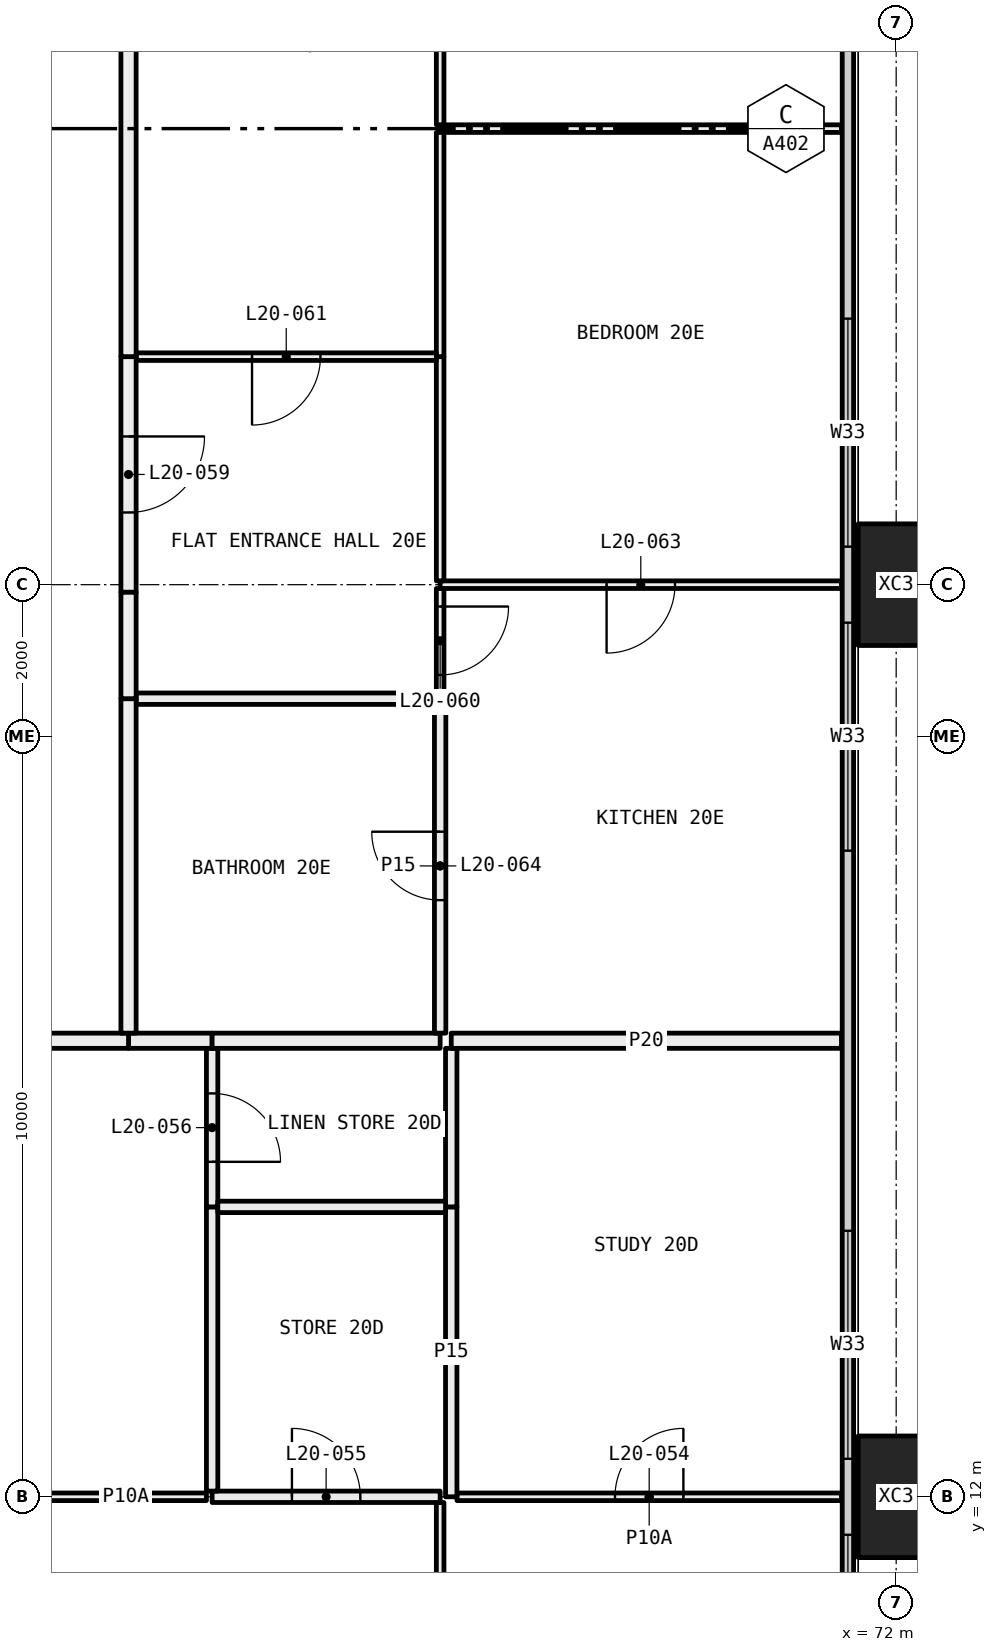
"""IFC4 building model, lengths in metres.
Left out: names, types, materials, properties, quantities, classifications, styles, units other than length and angle.
Written with IfcOpenShell. Run it as: python <this file> out.ifc"""

import sys

from ifc_helpers import new_model, si_unit, direction, frame, frame_2d, origin, origin_2d, place, context, subcontext, project, spatial, rectangle, hollow_rectangle, extrude, element, fill, save


model = new_model("IFC4")
c1 = context("Model", 3, precision=1e-05, world=origin(), true_north=direction((0.0, 1.0)))
c2 = subcontext(c1, "Body", "Model", "MODEL_VIEW")
j1 = project(units=[si_unit("LENGTHUNIT", "METRE"), si_unit("PLANEANGLEUNIT", "RADIAN")], contexts=[c1])
p1 = place(None, origin())
s1 = spatial("IfcSite", under=j1, at=p1, CompositionType="ELEMENT")
p2 = place(p1, origin())
s2 = spatial("IfcBuilding", under=s1, at=p2, CompositionType="ELEMENT")
p3 = place(p2, frame((0.0, 0.0, 81.75)))
s3 = spatial("IfcBuildingStorey", under=s2, at=p3, CompositionType="ELEMENT", Elevation=81.75)
for number, where, z_axis, x_axis in (
    (1, (72.0, 12.0, -0.4), (0.0, 0.0, 1.0), (0.0, 1.0, 0.0)),
    (2, (72.0, 24.0, -0.4), (0.0, 0.0, 1.0), (0.0, 1.0, 0.0)),
):
    element("IfcColumn", number, at=place(p3, frame(where, z_axis=z_axis, x_axis=x_axis)), inside=s3, PredefinedType="COLUMN", context=c2, shape_type="SweptSolid", body=[
        extrude(hollow_rectangle(XDim=1.6, YDim=1.0, WallThickness=0.065, at=origin_2d()), origin(), (0.0, 0.0, 1.0), 3.45),
    ])
p4 = place(p3, frame((71.365, 6.71, 0.0), z_axis=(0.0, 0.0, 1.0), x_axis=(0.0, 1.0, 0.0)))
e3 = element("IfcWall", 3, at=p4, inside=s3, PredefinedType="ELEMENTEDWALL", context=c2, shape_type="SweptSolid", body=[
    extrude(rectangle(XDim=34.58, YDim=0.15, at=frame_2d((17.29, 0.0))), origin(), (0.0, 0.0, 1.0), 3.05),
])
p5 = place(p4, frame((0.29, 0.0, 0.45)))
e4 = element("IfcOpeningElement", 4, at=p5, cuts=e3, PredefinedType="OPENING", context=c2, shape_type="SweptSolid", body=[
    extrude(rectangle(XDim=4.5, YDim=2.55, at=frame_2d((2.25, 1.275))), frame((0.0, 0.085, 0.0), z_axis=(0.0, -1.0, 0.0), x_axis=(1.0, 0.0, 0.0)), (0.0, 0.0, 1.0), 0.17),
])
p6 = place(p4, frame((5.79, 0.0, 0.45)))
e5 = element("IfcOpeningElement", 5, at=p6, cuts=e3, PredefinedType="OPENING", context=c2, shape_type="SweptSolid", body=[
    extrude(rectangle(XDim=3.0, YDim=2.55, at=frame_2d((1.5, 1.275))), frame((0.0, 0.085, 0.0), z_axis=(0.0, -1.0, 0.0), x_axis=(1.0, 0.0, 0.0)), (0.0, 0.0, 1.0), 0.17),
])
p7 = place(p4, frame((13.79, 0.0, 0.45)))
e6 = element("IfcOpeningElement", 6, at=p7, cuts=e3, PredefinedType="OPENING", context=c2, shape_type="SweptSolid", body=[
    extrude(rectangle(XDim=3.0, YDim=2.55, at=frame_2d((1.5, 1.275))), frame((0.0, 0.085, 0.0), z_axis=(0.0, -1.0, 0.0), x_axis=(1.0, 0.0, 0.0)), (0.0, 0.0, 1.0), 0.17),
])
p8 = place(p4, frame((17.79, 0.0, 0.45)))
e7 = element("IfcOpeningElement", 7, at=p8, cuts=e3, PredefinedType="OPENING", context=c2, shape_type="SweptSolid", body=[
    extrude(rectangle(XDim=3.0, YDim=2.55, at=frame_2d((1.5, 1.275))), frame((0.0, 0.085, 0.0), z_axis=(0.0, -1.0, 0.0), x_axis=(1.0, 0.0, 0.0)), (0.0, 0.0, 1.0), 0.17),
])
p9 = place(p4, frame((26.79, 0.0, 0.45)))
e8 = element("IfcOpeningElement", 8, at=p9, cuts=e3, PredefinedType="OPENING", context=c2, shape_type="SweptSolid", body=[
    extrude(rectangle(XDim=2.0, YDim=2.55, at=frame_2d((1.0, 1.275))), frame((0.0, 0.085, 0.0), z_axis=(0.0, -1.0, 0.0), x_axis=(1.0, 0.0, 0.0)), (0.0, 0.0, 1.0), 0.17),
])
p10 = place(p4, frame((29.79, 0.0, 0.45)))
e9 = element("IfcOpeningElement", 9, at=p10, cuts=e3, PredefinedType="OPENING", context=c2, shape_type="SweptSolid", body=[
    extrude(rectangle(XDim=4.5, YDim=2.55, at=frame_2d((2.25, 1.275))), frame((0.0, 0.085, 0.0), z_axis=(0.0, -1.0, 0.0), x_axis=(1.0, 0.0, 0.0)), (0.0, 0.0, 1.0), 0.17),
])
p11 = place(p3, frame((66.0, 6.72, 0.0), z_axis=(0.0, 0.0, 1.0), x_axis=(0.0, 1.0, 0.0)))
e10 = element("IfcWall", 10, at=p11, inside=s3, PredefinedType="PARTITIONING", context=c2, shape_type="SweptSolid", body=[
    extrude(rectangle(XDim=5.205, YDim=0.1, at=frame_2d((2.603, 0.0))), origin(), (0.0, 0.0, 1.0), 2.45),
])
p12 = place(p11, frame((2.153, 0.0, 0.0)))
e11 = element("IfcOpeningElement", 11, at=p12, cuts=e10, PredefinedType="OPENING", context=c2, shape_type="SweptSolid", body=[
    extrude(rectangle(XDim=0.9, YDim=2.1, at=frame_2d((0.45, 1.05))), frame((0.0, 0.06, 0.0), z_axis=(0.0, -1.0, 0.0), x_axis=(1.0, 0.0, 0.0)), (0.0, 0.0, 1.0), 0.12),
])
p13 = place(p3, frame((62.925, 12.0, 0.0), z_axis=(0.0, 0.0, 1.0), x_axis=(-1.0, 0.0, 0.0)))
e12 = element("IfcWall", 12, at=p13, inside=s3, PredefinedType="PARTITIONING", context=c2, shape_type="SweptSolid", body=[
    extrude(rectangle(XDim=2.125, YDim=0.1, at=frame_2d((1.062, 0.0))), origin(), (0.0, 0.0, 1.0), 2.45),
])
p14 = place(p3, frame((66.0, 12.0, 0.0), z_axis=(0.0, 0.0, 1.0), x_axis=(-1.0, 0.0, 0.0)))
e13 = element("IfcWall", 13, at=p14, inside=s3, PredefinedType="PARTITIONING", context=c2, shape_type="SweptSolid", body=[
    extrude(rectangle(XDim=3.0, YDim=0.15, at=frame_2d((1.5, 0.0))), origin(), (0.0, 0.0, 1.0), 2.45),
])
p15 = place(p14, frame((1.05, 0.0, 0.0)))
e14 = element("IfcOpeningElement", 14, at=p15, cuts=e13, PredefinedType="OPENING", context=c2, shape_type="SweptSolid", body=[
    extrude(rectangle(XDim=0.9, YDim=2.1, at=frame_2d((0.45, 1.05))), frame((0.0, 0.085, 0.0), z_axis=(0.0, -1.0, 0.0), x_axis=(1.0, 0.0, 0.0)), (0.0, 0.0, 1.0), 0.17),
])
p16 = place(p3, frame((71.28, 12.0, 0.0), z_axis=(0.0, 0.0, 1.0), x_axis=(-1.0, 0.0, 0.0)))
e15 = element("IfcWall", 15, at=p16, inside=s3, PredefinedType="PARTITIONING", context=c2, shape_type="SweptSolid", body=[
    extrude(rectangle(XDim=5.059, YDim=0.1, at=frame_2d((2.53, 0.0))), origin(), (0.0, 0.0, 1.0), 2.45),
])
p17 = place(p16, frame((2.08, 0.0, 0.0)))
e16 = element("IfcOpeningElement", 16, at=p17, cuts=e15, PredefinedType="OPENING", context=c2, shape_type="SweptSolid", body=[
    extrude(rectangle(XDim=0.9, YDim=2.1, at=frame_2d((0.45, 1.05))), frame((0.0, 0.06, 0.0), z_axis=(0.0, -1.0, 0.0), x_axis=(1.0, 0.0, 0.0)), (0.0, 0.0, 1.0), 0.12),
])
p18 = place(p3, frame((63.0, 12.075, 0.0), z_axis=(0.0, 0.0, 1.0), x_axis=(0.0, 1.0, 0.0)))
e17 = element("IfcWall", 17, at=p18, inside=s3, PredefinedType="PARTITIONING", context=c2, shape_type="SweptSolid", body=[
    extrude(rectangle(XDim=3.739, YDim=0.15, at=frame_2d((1.87, 0.0))), origin(), (0.0, 0.0, 1.0), 2.45),
])
p19 = place(p3, frame((63.0, 15.814, 0.0), z_axis=(0.0, 0.0, 1.0), x_axis=(0.0, 1.0, 0.0)))
e18 = element("IfcWall", 18, at=p19, inside=s3, PredefinedType="PARTITIONING", context=c2, shape_type="SweptSolid", body=[
    extrude(rectangle(XDim=2.086, YDim=0.15, at=frame_2d((1.043, 0.0))), origin(), (0.0, 0.0, 1.0), 3.05),
])
p20 = place(p19, frame((0.593, 0.0, 0.0)))
e19 = element("IfcOpeningElement", 19, at=p20, cuts=e18, PredefinedType="OPENING", context=c2, shape_type="SweptSolid", body=[
    extrude(rectangle(XDim=0.9, YDim=2.1, at=frame_2d((0.45, 1.05))), frame((0.0, 0.085, 0.0), z_axis=(0.0, -1.0, 0.0), x_axis=(1.0, 0.0, 0.0)), (0.0, 0.0, 1.0), 0.17),
])
p21 = place(p3, frame((63.0, 18.0, 0.0), z_axis=(0.0, 0.0, 1.0), x_axis=(-1.0, 0.0, 0.0)))
e20 = element("IfcWall", 20, at=p21, inside=s3, PredefinedType="PARTITIONING", context=c2, shape_type="SweptSolid", body=[
    extrude(rectangle(XDim=1.1, YDim=0.2, at=frame_2d((0.55, 0.0))), origin(), (0.0, 0.0, 1.0), 3.05),
])
p22 = place(p3, frame((61.9, 18.0, 0.0), z_axis=(0.0, 0.0, 1.0), x_axis=(-1.0, 0.0, 0.0)))
e21 = element("IfcWall", 21, at=p22, inside=s3, PredefinedType="PARTITIONING", context=c2, shape_type="SweptSolid", body=[
    extrude(rectangle(XDim=7.9, YDim=0.2, at=frame_2d((3.95, 0.0))), origin(), (0.0, 0.0, 1.0), 3.05),
])
p23 = place(p3, frame((66.146, 15.814, 0.0), z_axis=(0.0, 0.0, 1.0), x_axis=(0.0, -1.0, 0.0)))
e22 = element("IfcWall", 22, at=p23, inside=s3, PredefinedType="PARTITIONING", context=c2, shape_type="SweptSolid", body=[
    extrude(rectangle(XDim=3.814, YDim=0.15, at=frame_2d((1.907, 0.0))), origin(), (0.0, 0.0, 1.0), 2.45),
])
p24 = place(p3, frame((66.146, 17.9, 0.0), z_axis=(0.0, 0.0, 1.0), x_axis=(0.0, -1.0, 0.0)))
e23 = element("IfcWall", 23, at=p24, inside=s3, PredefinedType="PARTITIONING", context=c2, shape_type="SweptSolid", body=[
    extrude(rectangle(XDim=2.086, YDim=0.15, at=frame_2d((1.043, 0.0))), origin(), (0.0, 0.0, 1.0), 2.55),
])
p25 = place(p3, frame((71.28, 18.0, 0.0), z_axis=(0.0, 0.0, 1.0), x_axis=(-1.0, 0.0, 0.0)))
e24 = element("IfcWall", 24, at=p25, inside=s3, PredefinedType="PARTITIONING", context=c2, shape_type="SweptSolid", body=[
    extrude(rectangle(XDim=5.134, YDim=0.2, at=frame_2d((2.567, 0.0))), origin(), (0.0, 0.0, 1.0), 3.05),
])
p26 = place(p3, frame((66.071, 15.814, 0.0), z_axis=(0.0, 0.0, 1.0), x_axis=(-1.0, 0.0, 0.0)))
e25 = element("IfcWall", 25, at=p26, inside=s3, PredefinedType="PARTITIONING", context=c2, shape_type="SweptSolid", body=[
    extrude(rectangle(XDim=2.996, YDim=0.15, at=frame_2d((1.498, 0.0))), origin(), (0.0, 0.0, 1.0), 3.05),
])
p27 = place(p3, frame((66.0, 18.0, 0.0), z_axis=(0.0, 0.0, 1.0), x_axis=(-1.0, 0.0, 0.0)))
e26 = element("IfcWall", 26, at=p27, inside=s3, PredefinedType="PARTITIONING", context=c2, shape_type="SweptSolid", body=[
    extrude(rectangle(XDim=3.0, YDim=0.2, at=frame_2d((1.5, 0.0))), origin(), (0.0, 0.0, 1.0), 3.05),
])
p28 = place(p3, frame((71.28, 24.0, 0.0), z_axis=(0.0, 0.0, 1.0), x_axis=(-1.0, 0.0, 0.0)))
e27 = element("IfcWall", 27, at=p28, inside=s3, PredefinedType="PARTITIONING", context=c2, shape_type="SweptSolid", body=[
    extrude(rectangle(XDim=5.28, YDim=0.1, at=frame_2d((2.64, 0.0))), origin(), (0.0, 0.0, 1.0), 2.45),
])
p29 = place(p28, frame((2.19, 0.0, 0.0)))
e28 = element("IfcOpeningElement", 28, at=p29, cuts=e27, PredefinedType="OPENING", context=c2, shape_type="SweptSolid", body=[
    extrude(rectangle(XDim=0.9, YDim=2.1, at=frame_2d((0.45, 1.05))), frame((0.0, 0.06, 0.0), z_axis=(0.0, -1.0, 0.0), x_axis=(1.0, 0.0, 0.0)), (0.0, 0.0, 1.0), 0.12),
])
p30 = place(p3, frame((66.0, 22.5, 0.0), z_axis=(0.0, 0.0, 1.0), x_axis=(0.0, -1.0, 0.0)))
e29 = element("IfcWall", 29, at=p30, inside=s3, PredefinedType="PARTITIONING", context=c2, shape_type="SweptSolid", body=[
    extrude(rectangle(XDim=4.4, YDim=0.15, at=frame_2d((2.2, 0.0))), origin(), (0.0, 0.0, 1.0), 3.05),
])
p31 = place(p30, frame((1.75, 0.0, 0.0)))
e30 = element("IfcOpeningElement", 30, at=p31, cuts=e29, PredefinedType="OPENING", context=c2, shape_type="SweptSolid", body=[
    extrude(rectangle(XDim=0.9, YDim=2.1, at=frame_2d((0.45, 1.05))), frame((0.0, 0.085, 0.0), z_axis=(0.0, -1.0, 0.0), x_axis=(1.0, 0.0, 0.0)), (0.0, 0.0, 1.0), 0.17),
])
p32 = place(p3, frame((66.0, 23.95, 0.0), z_axis=(0.0, 0.0, 1.0), x_axis=(0.0, -1.0, 0.0)))
e31 = element("IfcWall", 31, at=p32, inside=s3, PredefinedType="PARTITIONING", context=c2, shape_type="SweptSolid", body=[
    extrude(rectangle(XDim=1.375, YDim=0.1, at=frame_2d((0.688, 0.0))), origin(), (0.0, 0.0, 1.0), 2.45),
])
p33 = place(p32, frame((0.238, 0.0, 0.0)))
e32 = element("IfcOpeningElement", 32, at=p33, cuts=e31, PredefinedType="OPENING", context=c2, shape_type="SweptSolid", body=[
    extrude(rectangle(XDim=0.9, YDim=2.1, at=frame_2d((0.45, 1.05))), frame((0.0, 0.06, 0.0), z_axis=(0.0, -1.0, 0.0), x_axis=(1.0, 0.0, 0.0)), (0.0, 0.0, 1.0), 0.12),
])
p34 = place(p3, frame((71.28, 30.0, 0.0), z_axis=(0.0, 0.0, 1.0), x_axis=(-1.0, 0.0, 0.0)))
e33 = element("IfcWall", 33, at=p34, inside=s3, PredefinedType="PARTITIONING", context=c2, shape_type="SweptSolid", body=[
    extrude(rectangle(XDim=5.28, YDim=0.1, at=frame_2d((2.64, 0.0))), origin(), (0.0, 0.0, 1.0), 3.05),
])
p35 = place(p3, frame((66.0, 27.0, 0.0), z_axis=(0.0, 0.0, 1.0), x_axis=(0.0, -1.0, 0.0)))
e34 = element("IfcWall", 34, at=p35, inside=s3, PredefinedType="PARTITIONING", context=c2, shape_type="SweptSolid", body=[
    extrude(rectangle(XDim=2.95, YDim=0.1, at=frame_2d((1.475, 0.0))), origin(), (0.0, 0.0, 1.0), 2.45),
])
p36 = place(p3, frame((66.0, 29.95, 0.0), z_axis=(0.0, 0.0, 1.0), x_axis=(0.0, -1.0, 0.0)))
e35 = element("IfcWall", 35, at=p36, inside=s3, PredefinedType="PARTITIONING", context=c2, shape_type="SweptSolid", body=[
    extrude(rectangle(XDim=2.95, YDim=0.1, at=frame_2d((1.475, 0.0))), origin(), (0.0, 0.0, 1.0), 3.05),
])
p37 = place(p3, frame((66.0, 35.9, 0.0), z_axis=(0.0, 0.0, 1.0), x_axis=(0.0, -1.0, 0.0)))
e36 = element("IfcWall", 36, at=p37, inside=s3, PredefinedType="PARTITIONING", context=c2, shape_type="SweptSolid", body=[
    extrude(rectangle(XDim=5.85, YDim=0.1, at=frame_2d((2.925, 0.0))), origin(), (0.0, 0.0, 1.0), 3.05),
])
p38 = place(p37, frame((2.475, 0.0, 0.0)))
e37 = element("IfcOpeningElement", 37, at=p38, cuts=e36, PredefinedType="OPENING", context=c2, shape_type="SweptSolid", body=[
    extrude(rectangle(XDim=0.9, YDim=2.1, at=frame_2d((0.45, 1.05))), frame((0.0, 0.06, 0.0), z_axis=(0.0, -1.0, 0.0), x_axis=(1.0, 0.0, 0.0)), (0.0, 0.0, 1.0), 0.12),
])
p39 = place(p3, frame((65.925, 22.5, 0.0), z_axis=(0.0, 0.0, 1.0), x_axis=(-1.0, 0.0, 0.0)))
e38 = element("IfcWall", 38, at=p39, inside=s3, PredefinedType="PARTITIONING", context=c2, shape_type="SweptSolid", body=[
    extrude(rectangle(XDim=3.925, YDim=0.15, at=frame_2d((1.962, 0.0))), origin(), (0.0, 0.0, 1.0), 3.05),
])
p40 = place(p3, frame((61.9, 22.5, 0.0), z_axis=(0.0, 0.0, 1.0), x_axis=(0.0, -1.0, 0.0)))
e39 = element("IfcWall", 39, at=p40, inside=s3, PredefinedType="PARTITIONING", context=c2, shape_type="SweptSolid", body=[
    extrude(rectangle(XDim=4.4, YDim=0.2, at=frame_2d((2.2, 0.0))), origin(), (0.0, 0.0, 1.0), 3.05),
])
p41 = place(p3, frame((65.95, 27.0, 0.0), z_axis=(0.0, 0.0, 1.0), x_axis=(-1.0, 0.0, 0.0)))
e40 = element("IfcWall", 40, at=p41, inside=s3, PredefinedType="PARTITIONING", context=c2, shape_type="SweptSolid", body=[
    extrude(rectangle(XDim=3.95, YDim=0.1, at=frame_2d((1.975, 0.0))), origin(), (0.0, 0.0, 1.0), 3.05),
])
p42 = place(p41, frame((1.525, 0.0, 0.0)))
e41 = element("IfcOpeningElement", 41, at=p42, cuts=e40, PredefinedType="OPENING", context=c2, shape_type="SweptSolid", body=[
    extrude(rectangle(XDim=0.9, YDim=2.1, at=frame_2d((0.45, 1.05))), frame((0.0, 0.06, 0.0), z_axis=(0.0, -1.0, 0.0), x_axis=(1.0, 0.0, 0.0)), (0.0, 0.0, 1.0), 0.12),
])
p43 = place(p3, frame((61.9, 27.0, 0.0), z_axis=(0.0, 0.0, 1.0), x_axis=(0.0, -1.0, 0.0)))
e42 = element("IfcWall", 42, at=p43, inside=s3, PredefinedType="PARTITIONING", context=c2, shape_type="SweptSolid", body=[
    extrude(rectangle(XDim=3.1, YDim=0.2, at=frame_2d((1.55, 0.0))), origin(), (0.0, 0.0, 1.0), 2.45),
])
p44 = place(p43, frame((1.05, 0.0, 0.0)))
e43 = element("IfcOpeningElement", 43, at=p44, cuts=e42, PredefinedType="OPENING", context=c2, shape_type="SweptSolid", body=[
    extrude(rectangle(XDim=1.0, YDim=2.1, at=frame_2d((0.5, 1.05))), frame((0.0, 0.11, 0.0), z_axis=(0.0, -1.0, 0.0), x_axis=(1.0, 0.0, 0.0)), (0.0, 0.0, 1.0), 0.22),
])
p45 = place(p3, frame((61.9, 23.9, 0.0), z_axis=(0.0, 0.0, 1.0), x_axis=(0.0, -1.0, 0.0)))
e44 = element("IfcWall", 44, at=p45, inside=s3, PredefinedType="PARTITIONING", context=c2, shape_type="SweptSolid", body=[
    extrude(rectangle(XDim=1.4, YDim=0.2, at=frame_2d((0.7, 0.0))), origin(), (0.0, 0.0, 1.0), 3.05),
])
p46 = place(p3, frame((61.9, 35.9, 0.0), z_axis=(0.0, 0.0, 1.0), x_axis=(0.0, -1.0, 0.0)))
e45 = element("IfcWall", 45, at=p46, inside=s3, PredefinedType="PARTITIONING", context=c2, shape_type="SweptSolid", body=[
    extrude(rectangle(XDim=8.9, YDim=0.2, at=frame_2d((4.45, 0.0))), origin(), (0.0, 0.0, 1.0), 3.05),
])
p47 = place(p5, origin())
e46 = element("IfcWindow", 46, at=p47, inside=s3, PartitioningType="SINGLE_PANEL", PredefinedType="WINDOW", context=c2, shape_type="SweptSolid", body=[
    extrude(rectangle(XDim=4.5, YDim=2.55, at=frame_2d((2.25, 1.275))), frame((0.0, 0.03, 0.0), z_axis=(0.0, -1.0, 0.0), x_axis=(1.0, 0.0, 0.0)), (0.0, 0.0, 1.0), 0.06),
])
fill(e4, e46)
p48 = place(p6, origin())
e47 = element("IfcWindow", 47, at=p48, inside=s3, PartitioningType="SINGLE_PANEL", PredefinedType="WINDOW", context=c2, shape_type="SweptSolid", body=[
    extrude(rectangle(XDim=3.0, YDim=2.55, at=frame_2d((1.5, 1.275))), frame((0.0, 0.03, 0.0), z_axis=(0.0, -1.0, 0.0), x_axis=(1.0, 0.0, 0.0)), (0.0, 0.0, 1.0), 0.06),
])
fill(e5, e47)
p49 = place(p7, origin())
e48 = element("IfcWindow", 48, at=p49, inside=s3, PartitioningType="SINGLE_PANEL", PredefinedType="WINDOW", context=c2, shape_type="SweptSolid", body=[
    extrude(rectangle(XDim=3.0, YDim=2.55, at=frame_2d((1.5, 1.275))), frame((0.0, 0.03, 0.0), z_axis=(0.0, -1.0, 0.0), x_axis=(1.0, 0.0, 0.0)), (0.0, 0.0, 1.0), 0.06),
])
fill(e6, e48)
p50 = place(p8, origin())
e49 = element("IfcWindow", 49, at=p50, inside=s3, PartitioningType="SINGLE_PANEL", PredefinedType="WINDOW", context=c2, shape_type="SweptSolid", body=[
    extrude(rectangle(XDim=3.0, YDim=2.55, at=frame_2d((1.5, 1.275))), frame((0.0, 0.03, 0.0), z_axis=(0.0, -1.0, 0.0), x_axis=(1.0, 0.0, 0.0)), (0.0, 0.0, 1.0), 0.06),
])
fill(e7, e49)
p51 = place(p17, frame((0.9, 0.0, 0.0), x_axis=(-1.0, 0.0, 0.0)))
e50 = element("IfcDoor", 50, at=p51, inside=s3, OperationType="SINGLE_SWING_LEFT", PredefinedType="DOOR", context=c2, shape_type="SweptSolid", body=[
    extrude(rectangle(XDim=0.9, YDim=2.1, at=frame_2d((0.45, 1.05))), frame((0.0, 0.025, 0.0), z_axis=(0.0, -1.0, 0.0), x_axis=(1.0, 0.0, 0.0)), (0.0, 0.0, 1.0), 0.05),
])
fill(e16, e50)
p52 = place(p15, frame((0.9, 0.0, 0.0), x_axis=(-1.0, 0.0, 0.0)))
e51 = element("IfcDoor", 51, at=p52, inside=s3, OperationType="SINGLE_SWING_RIGHT", PredefinedType="DOOR", context=c2, shape_type="SweptSolid", body=[
    extrude(rectangle(XDim=0.9, YDim=2.1, at=frame_2d((0.45, 1.05))), frame((0.0, 0.025, 0.0), z_axis=(0.0, -1.0, 0.0), x_axis=(1.0, 0.0, 0.0)), (0.0, 0.0, 1.0), 0.05),
])
fill(e14, e51)
p53 = place(p20, frame((0.9, 0.0, 0.0), x_axis=(-1.0, 0.0, 0.0)))
e52 = element("IfcDoor", 52, at=p53, inside=s3, OperationType="SINGLE_SWING_LEFT", PredefinedType="DOOR", context=c2, shape_type="SweptSolid", body=[
    extrude(rectangle(XDim=0.9, YDim=2.1, at=frame_2d((0.45, 1.05))), frame((0.0, 0.025, 0.0), z_axis=(0.0, -1.0, 0.0), x_axis=(1.0, 0.0, 0.0)), (0.0, 0.0, 1.0), 0.05),
])
fill(e19, e52)
p54 = place(p44, origin())
e53 = element("IfcDoor", 53, at=p54, inside=s3, OperationType="SINGLE_SWING_RIGHT", PredefinedType="DOOR", context=c2, shape_type="SweptSolid", body=[
    extrude(rectangle(XDim=1.0, YDim=2.1, at=frame_2d((0.5, 1.05))), frame((0.0, 0.025, 0.0), z_axis=(0.0, -1.0, 0.0), x_axis=(1.0, 0.0, 0.0)), (0.0, 0.0, 1.0), 0.05),
])
fill(e43, e53)
p55 = place(p33, origin())
e54 = element("IfcDoor", 54, at=p55, inside=s3, OperationType="SINGLE_SWING_RIGHT", PredefinedType="DOOR", context=c2, shape_type="SweptSolid", body=[
    extrude(rectangle(XDim=0.9, YDim=2.1, at=frame_2d((0.45, 1.05))), frame((0.0, 0.025, 0.0), z_axis=(0.0, -1.0, 0.0), x_axis=(1.0, 0.0, 0.0)), (0.0, 0.0, 1.0), 0.05),
])
fill(e32, e54)
p56 = place(p42, origin())
e55 = element("IfcDoor", 55, at=p56, inside=s3, OperationType="SINGLE_SWING_LEFT", PredefinedType="DOOR", context=c2, shape_type="SweptSolid", body=[
    extrude(rectangle(XDim=0.9, YDim=2.1, at=frame_2d((0.45, 1.05))), frame((0.0, 0.025, 0.0), z_axis=(0.0, -1.0, 0.0), x_axis=(1.0, 0.0, 0.0)), (0.0, 0.0, 1.0), 0.05),
])
fill(e41, e55)
p57 = place(p29, origin())
e56 = element("IfcDoor", 56, at=p57, inside=s3, OperationType="SINGLE_SWING_LEFT", PredefinedType="DOOR", context=c2, shape_type="SweptSolid", body=[
    extrude(rectangle(XDim=0.9, YDim=2.1, at=frame_2d((0.45, 1.05))), frame((0.0, 0.025, 0.0), z_axis=(0.0, -1.0, 0.0), x_axis=(1.0, 0.0, 0.0)), (0.0, 0.0, 1.0), 0.05),
])
fill(e28, e56)
p58 = place(p31, frame((0.9, 0.0, 0.0), x_axis=(-1.0, 0.0, 0.0)))
e57 = element("IfcDoor", 57, at=p58, inside=s3, OperationType="SINGLE_SWING_LEFT", PredefinedType="DOOR", context=c2, shape_type="SweptSolid", body=[
    extrude(rectangle(XDim=0.9, YDim=2.1, at=frame_2d((0.45, 1.05))), frame((0.0, 0.025, 0.0), z_axis=(0.0, -1.0, 0.0), x_axis=(1.0, 0.0, 0.0)), (0.0, 0.0, 1.0), 0.05),
])
fill(e30, e57)
save(model, sys.argv[1])
